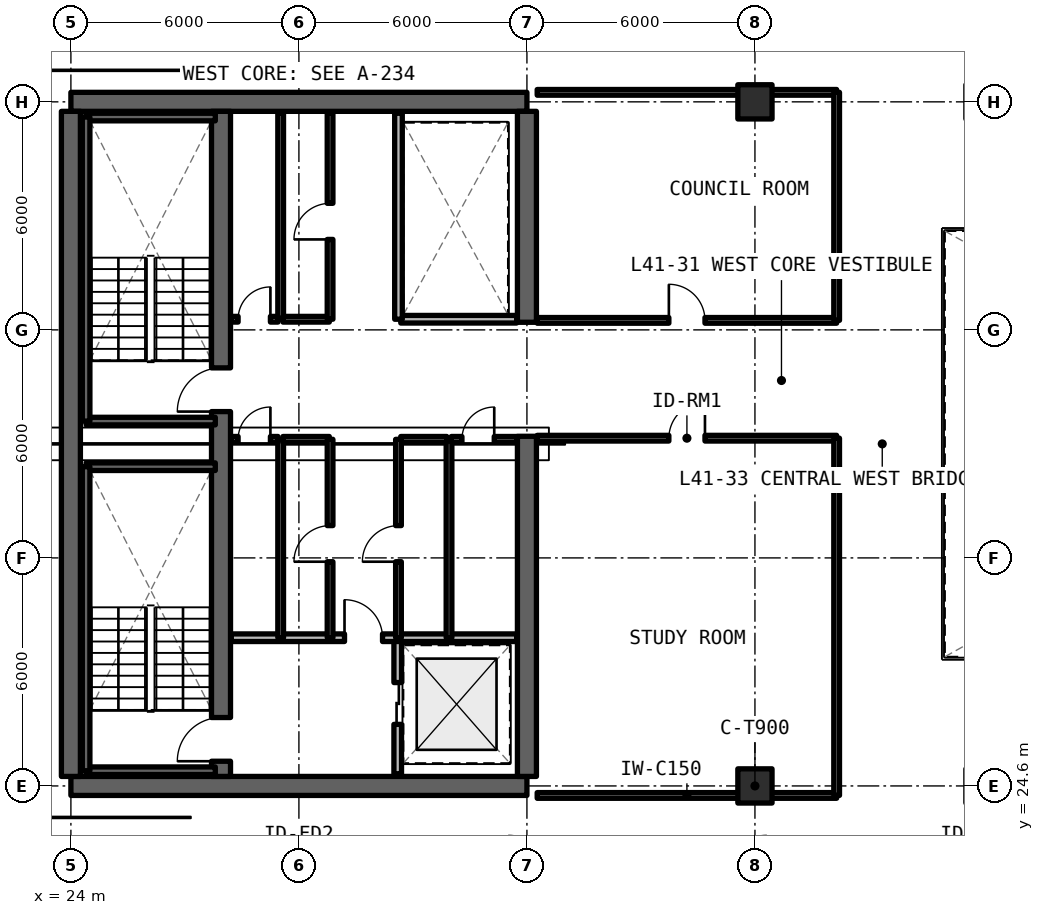
"""IFC4 building model, lengths in metres.
Left out: names, types, materials, properties, quantities, classifications, styles, units other than length and angle.
Written with IfcOpenShell. Run it as: python <this file> out.ifc"""

import sys

from ifc_helpers import new_model, si_unit, direction, frame, frame_2d, origin, origin_2d, place, context, subcontext, project, spatial, rectangle, extrude, element, fill, save


model = new_model("IFC4")
c1 = context("Model", 3, precision=1e-05, world=origin(), true_north=direction((0.0, 1.0)))
c2 = subcontext(c1, "Body", "Model", "MODEL_VIEW")
j1 = project(units=[si_unit("LENGTHUNIT", "METRE"), si_unit("PLANEANGLEUNIT", "RADIAN")], contexts=[c1])
p1 = place(None, origin())
s1 = spatial("IfcSite", under=j1, at=p1, CompositionType="ELEMENT")
p2 = place(p1, origin())
s2 = spatial("IfcBuilding", under=s1, at=p2, CompositionType="ELEMENT")
p3 = place(p2, frame((0.0, 0.0, 148.5)))
s3 = spatial("IfcBuildingStorey", under=s2, at=p3, CompositionType="ELEMENT", Elevation=148.5)
for number, where, z_axis, x_axis in (
    (1, (24.0, 24.6, 0.0), (0.0, 0.0, 1.0), (1.0, 0.0, 0.0)),
    (2, (36.0, 42.6, 0.0), (0.0, 0.0, 1.0), (-1.0, 0.0, 0.0)),
):
    element("IfcWall", number, at=place(p3, frame(where, z_axis=z_axis, x_axis=x_axis)), inside=s3, PredefinedType="SHEAR", context=c2, shape_type="SweptSolid", body=[
        extrude(rectangle(XDim=12.0, YDim=0.5, at=frame_2d((6.0, 0.0))), origin(), (0.0, 0.0, 1.0), 3.3),
    ])
p4 = place(p3, frame((24.0, 24.85, 0.0), z_axis=(0.0, 0.0, 1.0), x_axis=(0.0, 1.0, 0.0)))
e3 = element("IfcWall", 3, at=p4, inside=s3, PredefinedType="SHEAR", context=c2, shape_type="SweptSolid", body=[
    extrude(rectangle(XDim=17.5, YDim=0.5, at=frame_2d((8.75, 0.0))), origin(), (0.0, 0.0, 1.0), 3.3),
])
p5 = place(p3, frame((36.0, 24.85, 0.0), z_axis=(0.0, 0.0, 1.0), x_axis=(0.0, 1.0, 0.0)))
e4 = element("IfcWall", 4, at=p5, inside=s3, PredefinedType="SHEAR", context=c2, shape_type="SweptSolid", body=[
    extrude(rectangle(XDim=8.95, YDim=0.5, at=frame_2d((4.475, 0.0))), origin(), (0.0, 0.0, 1.0), 3.3),
])
p6 = place(p3, frame((36.0, 36.8, 0.0), z_axis=(0.0, 0.0, 1.0), x_axis=(0.0, 1.0, 0.0)))
e5 = element("IfcWall", 5, at=p6, inside=s3, PredefinedType="SHEAR", context=c2, shape_type="SweptSolid", body=[
    extrude(rectangle(XDim=5.55, YDim=0.5, at=frame_2d((2.775, 0.0))), origin(), (0.0, 0.0, 1.0), 3.3),
])
p7 = place(p3, frame((27.95, 24.85, 0.0), z_axis=(0.0, 0.0, 1.0), x_axis=(0.0, 1.0, 0.0)))
e6 = element("IfcWall", 6, at=p7, inside=s3, PredefinedType="SHEAR", context=c2, shape_type="SweptSolid", body=[
    extrude(rectangle(XDim=17.5, YDim=0.5, at=frame_2d((8.75, 0.0))), origin(), (0.0, 0.0, 1.0), 3.3),
])
p8 = place(p7, frame((0.4, 0.0, 0.0)))
e7 = element("IfcOpeningElement", 7, at=p8, cuts=e6, PredefinedType="OPENING", context=c2, shape_type="SweptSolid", body=[
    extrude(rectangle(XDim=1.15, YDim=2.15, at=frame_2d((0.575, 1.075))), frame((0.0, 0.26, 0.0), z_axis=(0.0, -1.0, 0.0), x_axis=(1.0, 0.0, 0.0)), (0.0, 0.0, 1.0), 0.52),
])
p9 = place(p7, frame((9.6, 0.0, 0.0)))
e8 = element("IfcOpeningElement", 8, at=p9, cuts=e6, PredefinedType="OPENING", context=c2, shape_type="SweptSolid", body=[
    extrude(rectangle(XDim=1.15, YDim=2.15, at=frame_2d((0.575, 1.075))), frame((0.0, 0.26, 0.0), z_axis=(0.0, -1.0, 0.0), x_axis=(1.0, 0.0, 0.0)), (0.0, 0.0, 1.0), 0.52),
])
for number, where, z_axis, x_axis in (
    (9, (42.0, 24.6, 0.0), (0.0, 0.0, 1.0), (1.0, 0.0, 0.0)),
    (10, (42.0, 42.6, 0.0), (0.0, 0.0, 1.0), (1.0, 0.0, 0.0)),
):
    element("IfcColumn", number, at=place(p3, frame(where, z_axis=z_axis, x_axis=x_axis)), inside=s3, PredefinedType="COLUMN", context=c2, shape_type="SweptSolid", body=[
        extrude(rectangle(XDim=0.9, YDim=0.9, at=origin_2d()), origin(), (0.0, 0.0, 1.0), 3.3),
    ])
p10 = place(p3, frame((32.6, 24.92, 0.0), z_axis=(0.0, 0.0, 1.0), x_axis=(0.0, 1.0, 0.0)))
e11 = element("IfcWall", 11, at=p10, inside=s3, PredefinedType="SOLIDWALL", context=c2, shape_type="SweptSolid", body=[
    extrude(rectangle(XDim=3.58, YDim=0.2, at=frame_2d((1.79, 0.0))), origin(), (0.0, 0.0, 1.0), 2.35),
])
p11 = place(p10, frame((1.3, 0.0, 0.0)))
e12 = element("IfcOpeningElement", 12, at=p11, cuts=e11, PredefinedType="OPENING", context=c2, shape_type="SweptSolid", body=[
    extrude(rectangle(XDim=1.1, YDim=2.2, at=frame_2d((0.55, 1.1))), frame((0.0, 0.11, 0.0), z_axis=(0.0, -1.0, 0.0), x_axis=(1.0, 0.0, 0.0)), (0.0, 0.0, 1.0), 0.22),
])
p12 = place(p3, frame((28.22, 28.5, 0.0), z_axis=(0.0, 0.0, 1.0), x_axis=(1.0, 0.0, 0.0)))
e13 = element("IfcWall", 13, at=p12, inside=s3, PredefinedType="SOLIDWALL", context=c2, shape_type="SweptSolid", body=[
    extrude(rectangle(XDim=7.51, YDim=0.2, at=frame_2d((3.755, 0.0))), origin(), (0.0, 0.0, 1.0), 2.35),
])
p13 = place(p12, frame((2.98, 0.0, 0.0)))
e14 = element("IfcOpeningElement", 14, at=p13, cuts=e13, PredefinedType="OPENING", context=c2, shape_type="SweptSolid", body=[
    extrude(rectangle(XDim=1.0, YDim=2.15, at=frame_2d((0.5, 1.075))), frame((0.0, 0.11, 0.0), z_axis=(0.0, -1.0, 0.0), x_axis=(1.0, 0.0, 0.0)), (0.0, 0.0, 1.0), 0.22),
])
p14 = place(p3, frame((29.52, 28.5, 0.0), z_axis=(0.0, 0.0, 1.0), x_axis=(0.0, 1.0, 0.0)))
e15 = element("IfcWall", 15, at=p14, inside=s3, PredefinedType="SOLIDWALL", context=c2, shape_type="SweptSolid", body=[
    extrude(rectangle(XDim=5.22, YDim=0.15, at=frame_2d((2.61, 0.0))), origin(), (0.0, 0.0, 1.0), 2.35),
])
p15 = place(p3, frame((28.22, 33.72, 0.0), z_axis=(0.0, 0.0, 1.0), x_axis=(1.0, 0.0, 0.0)))
e16 = element("IfcWall", 16, at=p15, inside=s3, PredefinedType="SOLIDWALL", context=c2, shape_type="SweptSolid", body=[
    extrude(rectangle(XDim=1.23, YDim=0.15, at=frame_2d((0.615, 0.0))), origin(), (0.0, 0.0, 1.0), 2.35),
])
p16 = place(p15, frame((0.18, 0.0, 0.0)))
e17 = element("IfcOpeningElement", 17, at=p16, cuts=e16, PredefinedType="OPENING", context=c2, shape_type="SweptSolid", body=[
    extrude(rectangle(XDim=0.85, YDim=2.1, at=frame_2d((0.425, 1.05))), frame((0.0, 0.085, 0.0), z_axis=(0.0, -1.0, 0.0), x_axis=(1.0, 0.0, 0.0)), (0.0, 0.0, 1.0), 0.17),
])
p17 = place(p3, frame((29.58, 33.72, 0.0), z_axis=(0.0, 0.0, 1.0), x_axis=(1.0, 0.0, 0.0)))
e18 = element("IfcWall", 18, at=p17, inside=s3, PredefinedType="SOLIDWALL", context=c2, shape_type="SweptSolid", body=[
    extrude(rectangle(XDim=1.22, YDim=0.15, at=frame_2d((0.61, 0.0))), origin(), (0.0, 0.0, 1.0), 2.35),
])
p18 = place(p3, frame((30.82, 28.5, 0.0), z_axis=(0.0, 0.0, 1.0), x_axis=(0.0, 1.0, 0.0)))
e19 = element("IfcWall", 19, at=p18, inside=s3, PredefinedType="SOLIDWALL", context=c2, shape_type="SweptSolid", body=[
    extrude(rectangle(XDim=5.22, YDim=0.15, at=frame_2d((2.61, 0.0))), origin(), (0.0, 0.0, 1.0), 2.35),
])
p19 = place(p18, frame((2.0, 0.0, 0.0)))
e20 = element("IfcOpeningElement", 20, at=p19, cuts=e19, PredefinedType="OPENING", context=c2, shape_type="SweptSolid", body=[
    extrude(rectangle(XDim=0.95, YDim=2.15, at=frame_2d((0.475, 1.075))), frame((0.0, 0.085, 0.0), z_axis=(0.0, -1.0, 0.0), x_axis=(1.0, 0.0, 0.0)), (0.0, 0.0, 1.0), 0.17),
])
p20 = place(p3, frame((33.95, 28.5, 0.0), z_axis=(0.0, 0.0, 1.0), x_axis=(0.0, 1.0, 0.0)))
e21 = element("IfcWall", 21, at=p20, inside=s3, PredefinedType="SOLIDWALL", context=c2, shape_type="SweptSolid", body=[
    extrude(rectangle(XDim=5.22, YDim=0.15, at=frame_2d((2.61, 0.0))), origin(), (0.0, 0.0, 1.0), 2.35),
])
p21 = place(p3, frame((32.68, 33.72, 0.0), z_axis=(0.0, 0.0, 1.0), x_axis=(1.0, 0.0, 0.0)))
e22 = element("IfcWall", 22, at=p21, inside=s3, PredefinedType="SOLIDWALL", context=c2, shape_type="SweptSolid", body=[
    extrude(rectangle(XDim=1.21, YDim=0.15, at=frame_2d((0.605, 0.0))), origin(), (0.0, 0.0, 1.0), 2.35),
])
p22 = place(p3, frame((34.01, 33.72, 0.0), z_axis=(0.0, 0.0, 1.0), x_axis=(1.0, 0.0, 0.0)))
e23 = element("IfcWall", 23, at=p22, inside=s3, PredefinedType="SOLIDWALL", context=c2, shape_type="SweptSolid", body=[
    extrude(rectangle(XDim=1.72, YDim=0.15, at=frame_2d((0.86, 0.0))), origin(), (0.0, 0.0, 1.0), 2.35),
])
p23 = place(p22, frame((0.28, 0.0, 0.0)))
e24 = element("IfcOpeningElement", 24, at=p23, cuts=e23, PredefinedType="OPENING", context=c2, shape_type="SweptSolid", body=[
    extrude(rectangle(XDim=0.85, YDim=2.1, at=frame_2d((0.425, 1.05))), frame((0.0, 0.085, 0.0), z_axis=(0.0, -1.0, 0.0), x_axis=(1.0, 0.0, 0.0)), (0.0, 0.0, 1.0), 0.17),
])
p24 = place(p3, frame((32.62, 28.5, 0.0), z_axis=(0.0, 0.0, 1.0), x_axis=(0.0, 1.0, 0.0)))
e25 = element("IfcWall", 25, at=p24, inside=s3, PredefinedType="SOLIDWALL", context=c2, shape_type="SweptSolid", body=[
    extrude(rectangle(XDim=5.22, YDim=0.15, at=frame_2d((2.61, 0.0))), origin(), (0.0, 0.0, 1.0), 2.35),
])
p25 = place(p24, frame((2.0, 0.0, 0.0)))
e26 = element("IfcOpeningElement", 26, at=p25, cuts=e25, PredefinedType="OPENING", context=c2, shape_type="SweptSolid", body=[
    extrude(rectangle(XDim=0.95, YDim=2.15, at=frame_2d((0.475, 1.075))), frame((0.0, 0.085, 0.0), z_axis=(0.0, -1.0, 0.0), x_axis=(1.0, 0.0, 0.0)), (0.0, 0.0, 1.0), 0.17),
])
p26 = place(p3, frame((29.52, 36.88, 0.0), z_axis=(0.0, 0.0, 1.0), x_axis=(0.0, 1.0, 0.0)))
e27 = element("IfcWall", 27, at=p26, inside=s3, PredefinedType="SOLIDWALL", context=c2, shape_type="SweptSolid", body=[
    extrude(rectangle(XDim=5.42, YDim=0.15, at=frame_2d((2.71, 0.0))), origin(), (0.0, 0.0, 1.0), 2.35),
])
p27 = place(p3, frame((28.22, 36.88, 0.0), z_axis=(0.0, 0.0, 1.0), x_axis=(1.0, 0.0, 0.0)))
e28 = element("IfcWall", 28, at=p27, inside=s3, PredefinedType="SOLIDWALL", context=c2, shape_type="SweptSolid", body=[
    extrude(rectangle(XDim=1.23, YDim=0.15, at=frame_2d((0.615, 0.0))), origin(), (0.0, 0.0, 1.0), 2.35),
])
p28 = place(p27, frame((0.18, 0.0, 0.0)))
e29 = element("IfcOpeningElement", 29, at=p28, cuts=e28, PredefinedType="OPENING", context=c2, shape_type="SweptSolid", body=[
    extrude(rectangle(XDim=0.85, YDim=2.1, at=frame_2d((0.425, 1.05))), frame((0.0, 0.085, 0.0), z_axis=(0.0, -1.0, 0.0), x_axis=(1.0, 0.0, 0.0)), (0.0, 0.0, 1.0), 0.17),
])
p29 = place(p3, frame((29.58, 36.88, 0.0), z_axis=(0.0, 0.0, 1.0), x_axis=(1.0, 0.0, 0.0)))
e30 = element("IfcWall", 30, at=p29, inside=s3, PredefinedType="SOLIDWALL", context=c2, shape_type="SweptSolid", body=[
    extrude(rectangle(XDim=1.22, YDim=0.15, at=frame_2d((0.61, 0.0))), origin(), (0.0, 0.0, 1.0), 2.35),
])
p30 = place(p3, frame((30.82, 36.88, 0.0), z_axis=(0.0, 0.0, 1.0), x_axis=(0.0, 1.0, 0.0)))
e31 = element("IfcWall", 31, at=p30, inside=s3, PredefinedType="SOLIDWALL", context=c2, shape_type="SweptSolid", body=[
    extrude(rectangle(XDim=5.42, YDim=0.15, at=frame_2d((2.71, 0.0))), origin(), (0.0, 0.0, 1.0), 2.35),
])
p31 = place(p30, frame((2.1, 0.0, 0.0)))
e32 = element("IfcOpeningElement", 32, at=p31, cuts=e31, PredefinedType="OPENING", context=c2, shape_type="SweptSolid", body=[
    extrude(rectangle(XDim=0.95, YDim=2.15, at=frame_2d((0.475, 1.075))), frame((0.0, 0.085, 0.0), z_axis=(0.0, -1.0, 0.0), x_axis=(1.0, 0.0, 0.0)), (0.0, 0.0, 1.0), 0.17),
])
p32 = place(p3, frame((32.68, 36.88, 0.0), z_axis=(0.0, 0.0, 1.0), x_axis=(1.0, 0.0, 0.0)))
e33 = element("IfcWall", 33, at=p32, inside=s3, PredefinedType="SOLIDWALL", context=c2, shape_type="SweptSolid", body=[
    extrude(rectangle(XDim=3.05, YDim=0.2, at=frame_2d((1.525, 0.0))), origin(), (0.0, 0.0, 1.0), 2.35),
])
p33 = place(p3, frame((32.62, 36.88, 0.0), z_axis=(0.0, 0.0, 1.0), x_axis=(0.0, 1.0, 0.0)))
e34 = element("IfcWall", 34, at=p33, inside=s3, PredefinedType="SOLIDWALL", context=c2, shape_type="SweptSolid", body=[
    extrude(rectangle(XDim=5.42, YDim=0.2, at=frame_2d((2.71, 0.0))), origin(), (0.0, 0.0, 1.0), 2.35),
])
p34 = place(p3, frame((36.27, 24.35, 0.0), z_axis=(0.0, 0.0, 1.0), x_axis=(1.0, 0.0, 0.0)))
e35 = element("IfcWall", 35, at=p34, inside=s3, PredefinedType="SOLIDWALL", context=c2, shape_type="SweptSolid", body=[
    extrude(rectangle(XDim=7.88, YDim=0.15, at=frame_2d((3.94, 0.0))), origin(), (0.0, 0.0, 1.0), 2.35),
])
p35 = place(p3, frame((36.27, 33.75, 0.0), z_axis=(0.0, 0.0, 1.0), x_axis=(1.0, 0.0, 0.0)))
e36 = element("IfcWall", 36, at=p35, inside=s3, PredefinedType="SOLIDWALL", context=c2, shape_type="SweptSolid", body=[
    extrude(rectangle(XDim=7.88, YDim=0.15, at=frame_2d((3.94, 0.0))), origin(), (0.0, 0.0, 1.0), 2.35),
])
p36 = place(p35, frame((3.465, 0.0, 0.0)))
e37 = element("IfcOpeningElement", 37, at=p36, cuts=e36, PredefinedType="OPENING", context=c2, shape_type="SweptSolid", body=[
    extrude(rectangle(XDim=0.95, YDim=2.15, at=frame_2d((0.475, 1.075))), frame((0.0, 0.085, 0.0), z_axis=(0.0, -1.0, 0.0), x_axis=(1.0, 0.0, 0.0)), (0.0, 0.0, 1.0), 0.17),
])
p37 = place(p3, frame((44.15, 24.35, 0.0), z_axis=(0.0, 0.0, 1.0), x_axis=(0.0, 1.0, 0.0)))
e38 = element("IfcWall", 38, at=p37, inside=s3, PredefinedType="SOLIDWALL", context=c2, shape_type="SweptSolid", body=[
    extrude(rectangle(XDim=9.4, YDim=0.15, at=frame_2d((4.7, 0.0))), origin(), (0.0, 0.0, 1.0), 2.35),
])
p38 = place(p3, frame((36.27, 36.85, 0.0), z_axis=(0.0, 0.0, 1.0), x_axis=(1.0, 0.0, 0.0)))
e39 = element("IfcWall", 39, at=p38, inside=s3, PredefinedType="SOLIDWALL", context=c2, shape_type="SweptSolid", body=[
    extrude(rectangle(XDim=7.88, YDim=0.15, at=frame_2d((3.94, 0.0))), origin(), (0.0, 0.0, 1.0), 2.35),
])
p39 = place(p38, frame((3.465, 0.0, 0.0)))
e40 = element("IfcOpeningElement", 40, at=p39, cuts=e39, PredefinedType="OPENING", context=c2, shape_type="SweptSolid", body=[
    extrude(rectangle(XDim=0.95, YDim=2.15, at=frame_2d((0.475, 1.075))), frame((0.0, 0.085, 0.0), z_axis=(0.0, -1.0, 0.0), x_axis=(1.0, 0.0, 0.0)), (0.0, 0.0, 1.0), 0.17),
])
p40 = place(p3, frame((36.27, 42.85, 0.0), z_axis=(0.0, 0.0, 1.0), x_axis=(1.0, 0.0, 0.0)))
e41 = element("IfcWall", 41, at=p40, inside=s3, PredefinedType="SOLIDWALL", context=c2, shape_type="SweptSolid", body=[
    extrude(rectangle(XDim=7.88, YDim=0.15, at=frame_2d((3.94, 0.0))), origin(), (0.0, 0.0, 1.0), 2.35),
])
p41 = place(p3, frame((44.15, 36.85, 0.0), z_axis=(0.0, 0.0, 1.0), x_axis=(0.0, 1.0, 0.0)))
e42 = element("IfcWall", 42, at=p41, inside=s3, PredefinedType="SOLIDWALL", context=c2, shape_type="SweptSolid", body=[
    extrude(rectangle(XDim=6.0, YDim=0.15, at=frame_2d((3.0, 0.0))), origin(), (0.0, 0.0, 1.0), 2.35),
])
for number, where, z_axis, x_axis in (
    (43, (24.4, 25.0, 0.0), (0.0, 0.0, 1.0), (1.0, 0.0, 0.0)),
    (44, (27.8, 33.0, 0.0), (0.0, 0.0, 1.0), (-1.0, 0.0, 0.0)),
):
    element("IfcWall", number, at=place(p3, frame(where, z_axis=z_axis, x_axis=x_axis)), inside=s3, PredefinedType="SOLIDWALL", context=c2, shape_type="SweptSolid", body=[
        extrude(rectangle(XDim=3.4, YDim=0.2, at=frame_2d((1.7, 0.0))), origin(), (0.0, 0.0, 1.0), 3.3),
    ])
p42 = place(p3, frame((24.4, 33.0, 0.0), z_axis=(0.0, 0.0, 1.0), x_axis=(0.0, -1.0, 0.0)))
e45 = element("IfcWall", 45, at=p42, inside=s3, PredefinedType="SOLIDWALL", context=c2, shape_type="SweptSolid", body=[
    extrude(rectangle(XDim=8.0, YDim=0.2, at=frame_2d((4.0, 0.0))), origin(), (0.0, 0.0, 1.0), 3.3),
])
for number, where, z_axis, x_axis in (
    (46, (24.4, 34.2, 0.0), (0.0, 0.0, 1.0), (1.0, 0.0, 0.0)),
    (47, (27.8, 42.2, 0.0), (0.0, 0.0, 1.0), (-1.0, 0.0, 0.0)),
):
    element("IfcWall", number, at=place(p3, frame(where, z_axis=z_axis, x_axis=x_axis)), inside=s3, PredefinedType="SOLIDWALL", context=c2, shape_type="SweptSolid", body=[
        extrude(rectangle(XDim=3.4, YDim=0.2, at=frame_2d((1.7, 0.0))), origin(), (0.0, 0.0, 1.0), 3.3),
    ])
p43 = place(p3, frame((24.4, 42.2, 0.0), z_axis=(0.0, 0.0, 1.0), x_axis=(0.0, -1.0, 0.0)))
e48 = element("IfcWall", 48, at=p43, inside=s3, PredefinedType="SOLIDWALL", context=c2, shape_type="SweptSolid", body=[
    extrude(rectangle(XDim=8.0, YDim=0.2, at=frame_2d((4.0, 0.0))), origin(), (0.0, 0.0, 1.0), 3.3),
])
p44 = place(p11, origin())
e49 = element("IfcDoor", 49, at=p44, inside=s3, OperationType="SLIDING_TO_LEFT", PredefinedType="DOOR", context=c2, shape_type="SweptSolid", body=[
    extrude(rectangle(XDim=1.1, YDim=2.2, at=frame_2d((0.55, 1.1))), frame((0.0, 0.025, 0.0), z_axis=(0.0, -1.0, 0.0), x_axis=(1.0, 0.0, 0.0)), (0.0, 0.0, 1.0), 0.05),
])
fill(e12, e49)
p45 = place(p13, origin())
e50 = element("IfcDoor", 50, at=p45, inside=s3, OperationType="SINGLE_SWING_LEFT", PredefinedType="DOOR", context=c2, shape_type="SweptSolid", body=[
    extrude(rectangle(XDim=1.0, YDim=2.15, at=frame_2d((0.5, 1.075))), frame((0.0, 0.025, 0.0), z_axis=(0.0, -1.0, 0.0), x_axis=(1.0, 0.0, 0.0)), (0.0, 0.0, 1.0), 0.05),
])
fill(e14, e50)
p46 = place(p16, origin())
e51 = element("IfcDoor", 51, at=p46, inside=s3, OperationType="SINGLE_SWING_RIGHT", PredefinedType="DOOR", context=c2, shape_type="SweptSolid", body=[
    extrude(rectangle(XDim=0.85, YDim=2.1, at=frame_2d((0.425, 1.05))), frame((0.0, 0.025, 0.0), z_axis=(0.0, -1.0, 0.0), x_axis=(1.0, 0.0, 0.0)), (0.0, 0.0, 1.0), 0.05),
])
fill(e17, e51)
p47 = place(p19, origin())
e52 = element("IfcDoor", 52, at=p47, inside=s3, OperationType="SINGLE_SWING_LEFT", PredefinedType="DOOR", context=c2, shape_type="SweptSolid", body=[
    extrude(rectangle(XDim=0.95, YDim=2.15, at=frame_2d((0.475, 1.075))), frame((0.0, 0.025, 0.0), z_axis=(0.0, -1.0, 0.0), x_axis=(1.0, 0.0, 0.0)), (0.0, 0.0, 1.0), 0.05),
])
fill(e20, e52)
p48 = place(p23, origin())
e53 = element("IfcDoor", 53, at=p48, inside=s3, OperationType="SINGLE_SWING_RIGHT", PredefinedType="DOOR", context=c2, shape_type="SweptSolid", body=[
    extrude(rectangle(XDim=0.85, YDim=2.1, at=frame_2d((0.425, 1.05))), frame((0.0, 0.025, 0.0), z_axis=(0.0, -1.0, 0.0), x_axis=(1.0, 0.0, 0.0)), (0.0, 0.0, 1.0), 0.05),
])
fill(e24, e53)
p49 = place(p25, origin())
e54 = element("IfcDoor", 54, at=p49, inside=s3, OperationType="SINGLE_SWING_LEFT", PredefinedType="DOOR", context=c2, shape_type="SweptSolid", body=[
    extrude(rectangle(XDim=0.95, YDim=2.15, at=frame_2d((0.475, 1.075))), frame((0.0, 0.025, 0.0), z_axis=(0.0, -1.0, 0.0), x_axis=(1.0, 0.0, 0.0)), (0.0, 0.0, 1.0), 0.05),
])
fill(e26, e54)
p50 = place(p28, origin())
e55 = element("IfcDoor", 55, at=p50, inside=s3, OperationType="SINGLE_SWING_RIGHT", PredefinedType="DOOR", context=c2, shape_type="SweptSolid", body=[
    extrude(rectangle(XDim=0.85, YDim=2.1, at=frame_2d((0.425, 1.05))), frame((0.0, 0.025, 0.0), z_axis=(0.0, -1.0, 0.0), x_axis=(1.0, 0.0, 0.0)), (0.0, 0.0, 1.0), 0.05),
])
fill(e29, e55)
p51 = place(p31, origin())
e56 = element("IfcDoor", 56, at=p51, inside=s3, OperationType="SINGLE_SWING_LEFT", PredefinedType="DOOR", context=c2, shape_type="SweptSolid", body=[
    extrude(rectangle(XDim=0.95, YDim=2.15, at=frame_2d((0.475, 1.075))), frame((0.0, 0.025, 0.0), z_axis=(0.0, -1.0, 0.0), x_axis=(1.0, 0.0, 0.0)), (0.0, 0.0, 1.0), 0.05),
])
fill(e32, e56)
p52 = place(p36, origin())
e57 = element("IfcDoor", 57, at=p52, inside=s3, OperationType="SINGLE_SWING_RIGHT", PredefinedType="DOOR", context=c2, shape_type="SweptSolid", body=[
    extrude(rectangle(XDim=0.95, YDim=2.15, at=frame_2d((0.475, 1.075))), frame((0.0, 0.025, 0.0), z_axis=(0.0, -1.0, 0.0), x_axis=(1.0, 0.0, 0.0)), (0.0, 0.0, 1.0), 0.05),
])
fill(e37, e57)
p53 = place(p39, origin())
e58 = element("IfcDoor", 58, at=p53, inside=s3, OperationType="SINGLE_SWING_LEFT", PredefinedType="DOOR", context=c2, shape_type="SweptSolid", body=[
    extrude(rectangle(XDim=0.95, YDim=2.15, at=frame_2d((0.475, 1.075))), frame((0.0, 0.025, 0.0), z_axis=(0.0, -1.0, 0.0), x_axis=(1.0, 0.0, 0.0)), (0.0, 0.0, 1.0), 0.05),
])
fill(e40, e58)
p54 = place(p8, origin())
e59 = element("IfcDoor", 59, at=p54, inside=s3, OperationType="SINGLE_SWING_LEFT", PredefinedType="DOOR", context=c2, shape_type="SweptSolid", body=[
    extrude(rectangle(XDim=1.15, YDim=2.15, at=frame_2d((0.575, 1.075))), frame((0.0, 0.025, 0.0), z_axis=(0.0, -1.0, 0.0), x_axis=(1.0, 0.0, 0.0)), (0.0, 0.0, 1.0), 0.05),
])
fill(e7, e59)
p55 = place(p9, origin())
e60 = element("IfcDoor", 60, at=p55, inside=s3, OperationType="SINGLE_SWING_RIGHT", PredefinedType="DOOR", context=c2, shape_type="SweptSolid", body=[
    extrude(rectangle(XDim=1.15, YDim=2.15, at=frame_2d((0.575, 1.075))), frame((0.0, 0.025, 0.0), z_axis=(0.0, -1.0, 0.0), x_axis=(1.0, 0.0, 0.0)), (0.0, 0.0, 1.0), 0.05),
])
fill(e8, e60)
save(model, sys.argv[1])
